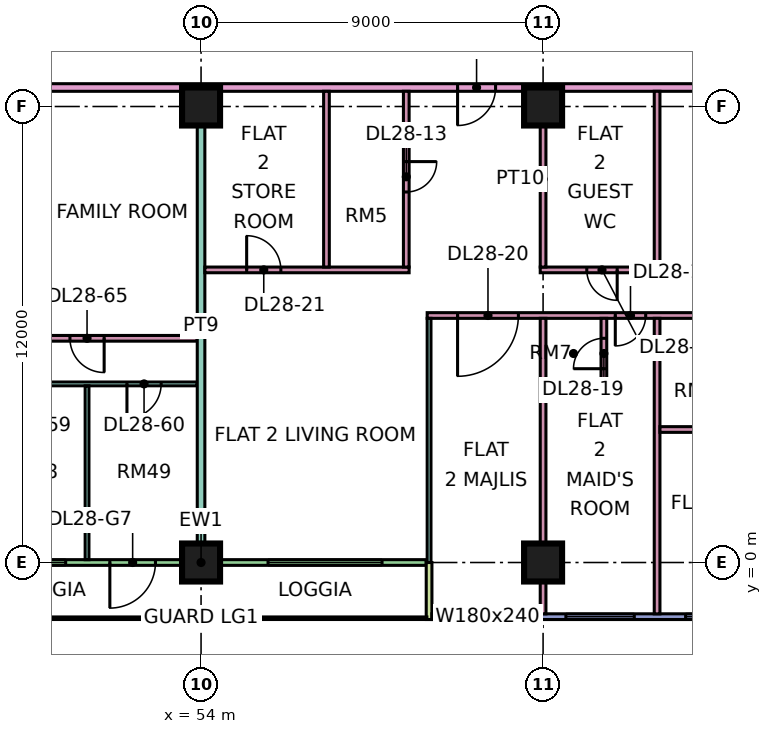
"""IFC4 building model, lengths in metres.
Left out: names, types, materials, properties, quantities, classifications, styles, units other than length and angle.
Written with IfcOpenShell. Run it as: python <this file> out.ifc"""

import sys

from ifc_helpers import new_model, si_unit, direction, frame, frame_2d, origin, origin_2d, place, context, subcontext, project, spatial, rectangle, extrude, element, fill, save


model = new_model("IFC4")
c1 = context("Model", 3, precision=1e-05, world=origin(), true_north=direction((0.0, 1.0)))
c2 = subcontext(c1, "Body", "Model", "MODEL_VIEW")
j1 = project(units=[si_unit("LENGTHUNIT", "METRE"), si_unit("PLANEANGLEUNIT", "RADIAN")], contexts=[c1])
p1 = place(None, origin())
s1 = spatial("IfcSite", under=j1, at=p1, CompositionType="ELEMENT")
p2 = place(p1, origin())
s2 = spatial("IfcBuilding", under=s1, at=p2, CompositionType="ELEMENT")
p3 = place(p2, frame((0.0, 0.0, 121.9)))
s3 = spatial("IfcBuildingStorey", under=s2, at=p3, CompositionType="ELEMENT", Elevation=121.9)
for number, where, z_axis, x_axis in (
    (1, (54.0, 0.0, 0.0), (0.0, 0.0, 1.0), (1.0, 0.0, 0.0)),
    (2, (54.0, 12.0, 0.0), (0.0, 0.0, 1.0), (1.0, 0.0, 0.0)),
    (3, (63.0, 0.0, 0.0), (0.0, 0.0, 1.0), (1.0, 0.0, 0.0)),
    (4, (63.0, 12.0, 0.0), (0.0, 0.0, 1.0), (1.0, 0.0, 0.0)),
):
    element("IfcColumn", number, at=place(p3, frame(where, z_axis=z_axis, x_axis=x_axis)), inside=s3, PredefinedType="COLUMN", context=c2, shape_type="SweptSolid", body=[
        extrude(rectangle(XDim=1.0, YDim=1.0, at=origin_2d()), origin(), (0.0, 0.0, 1.0), 3.75),
    ])
p4 = place(p3, frame((48.075, 0.0, 0.0), z_axis=(0.0, 0.0, 1.0), x_axis=(1.0, 0.0, 0.0)))
e5 = element("IfcWall", 5, at=p4, inside=s3, PredefinedType="SOLIDWALL", context=c2, shape_type="SweptSolid", body=[
    extrude(rectangle(XDim=11.85, YDim=0.15, at=frame_2d((5.925, 0.0))), origin(), (0.0, 0.0, 1.0), 3.35),
])
p5 = place(p4, frame((0.562, 0.0, 0.45)))
e6 = element("IfcOpeningElement", 6, at=p5, cuts=e5, PredefinedType="OPENING", context=c2, shape_type="SweptSolid", body=[
    extrude(rectangle(XDim=1.8, YDim=2.4, at=frame_2d((0.9, 1.2))), frame((0.0, 0.085, 0.0), z_axis=(0.0, -1.0, 0.0), x_axis=(1.0, 0.0, 0.0)), (0.0, 0.0, 1.0), 0.17),
])
p6 = place(p4, frame((3.525, 0.0, 0.0)))
e7 = element("IfcOpeningElement", 7, at=p6, cuts=e5, PredefinedType="OPENING", context=c2, shape_type="SweptSolid", body=[
    extrude(rectangle(XDim=1.2, YDim=2.4, at=frame_2d((0.6, 1.2))), frame((0.0, 0.085, 0.0), z_axis=(0.0, -1.0, 0.0), x_axis=(1.0, 0.0, 0.0)), (0.0, 0.0, 1.0), 0.17),
])
p7 = place(p4, frame((7.688, 0.0, 0.45)))
e8 = element("IfcOpeningElement", 8, at=p7, cuts=e5, PredefinedType="OPENING", context=c2, shape_type="SweptSolid", body=[
    extrude(rectangle(XDim=3.0, YDim=2.4, at=frame_2d((1.5, 1.2))), frame((0.0, 0.085, 0.0), z_axis=(0.0, -1.0, 0.0), x_axis=(1.0, 0.0, 0.0)), (0.0, 0.0, 1.0), 0.17),
])
p8 = place(p3, frame((60.0, -1.5, 0.0), z_axis=(0.0, 0.0, 1.0), x_axis=(0.0, 1.0, 0.0)))
e9 = element("IfcWall", 9, at=p8, inside=s3, PredefinedType="SOLIDWALL", context=c2, shape_type="SweptSolid", body=[
    extrude(rectangle(XDim=1.5, YDim=0.15, at=frame_2d((0.75, 0.0))), origin(), (0.0, 0.0, 1.0), 3.35),
])
p9 = place(p3, frame((60.075, -1.425, 0.0), z_axis=(0.0, 0.0, 1.0), x_axis=(1.0, 0.0, 0.0)))
e10 = element("IfcWall", 10, at=p9, inside=s3, PredefinedType="SOLIDWALL", context=c2, shape_type="SweptSolid", body=[
    extrude(rectangle(XDim=10.425, YDim=0.15, at=frame_2d((5.212, 0.0))), origin(), (0.0, 0.0, 1.0), 3.35),
])
p10 = place(p9, frame((0.562, 0.0, 0.45)))
e11 = element("IfcOpeningElement", 11, at=p10, cuts=e10, PredefinedType="OPENING", context=c2, shape_type="SweptSolid", body=[
    extrude(rectangle(XDim=1.8, YDim=2.4, at=frame_2d((0.9, 1.2))), frame((0.0, 0.085, 0.0), z_axis=(0.0, -1.0, 0.0), x_axis=(1.0, 0.0, 0.0)), (0.0, 0.0, 1.0), 0.17),
])
p11 = place(p9, frame((3.525, 0.0, 0.45)))
e12 = element("IfcOpeningElement", 12, at=p11, cuts=e10, PredefinedType="OPENING", context=c2, shape_type="SweptSolid", body=[
    extrude(rectangle(XDim=1.8, YDim=2.4, at=frame_2d((0.9, 1.2))), frame((0.0, 0.085, 0.0), z_axis=(0.0, -1.0, 0.0), x_axis=(1.0, 0.0, 0.0)), (0.0, 0.0, 1.0), 0.17),
])
p12 = place(p9, frame((6.675, 0.0, 0.45)))
e13 = element("IfcOpeningElement", 13, at=p12, cuts=e10, PredefinedType="OPENING", context=c2, shape_type="SweptSolid", body=[
    extrude(rectangle(XDim=3.0, YDim=2.4, at=frame_2d((1.5, 1.2))), frame((0.0, 0.085, 0.0), z_axis=(0.0, -1.0, 0.0), x_axis=(1.0, 0.0, 0.0)), (0.0, 0.0, 1.0), 0.17),
])
p13 = place(p3, frame((33.05, 4.7, 0.0), z_axis=(0.0, 0.0, 1.0), x_axis=(1.0, 0.0, 0.0)))
e14 = element("IfcWall", 14, at=p13, inside=s3, PredefinedType="PARTITIONING", context=c2, shape_type="SweptSolid", body=[
    extrude(rectangle(XDim=20.85, YDim=0.1, at=frame_2d((10.425, 0.0))), origin(), (0.0, 0.0, 1.0), 3.35),
])
p14 = place(p13, frame((1.0, 0.0, 0.0)))
e15 = element("IfcOpeningElement", 15, at=p14, cuts=e14, PredefinedType="OPENING", context=c2, shape_type="SweptSolid", body=[
    extrude(rectangle(XDim=0.9, YDim=2.1, at=frame_2d((0.45, 1.05))), frame((0.0, 0.06, 0.0), z_axis=(0.0, -1.0, 0.0), x_axis=(1.0, 0.0, 0.0)), (0.0, 0.0, 1.0), 0.12),
])
p15 = place(p13, frame((4.0, 0.0, 0.0)))
e16 = element("IfcOpeningElement", 16, at=p15, cuts=e14, PredefinedType="OPENING", context=c2, shape_type="SweptSolid", body=[
    extrude(rectangle(XDim=0.9, YDim=2.1, at=frame_2d((0.45, 1.05))), frame((0.0, 0.06, 0.0), z_axis=(0.0, -1.0, 0.0), x_axis=(1.0, 0.0, 0.0)), (0.0, 0.0, 1.0), 0.12),
])
p16 = place(p13, frame((16.0, 0.0, 0.0)))
e17 = element("IfcOpeningElement", 17, at=p16, cuts=e14, PredefinedType="OPENING", context=c2, shape_type="SweptSolid", body=[
    extrude(rectangle(XDim=0.9, YDim=2.1, at=frame_2d((0.45, 1.05))), frame((0.0, 0.06, 0.0), z_axis=(0.0, -1.0, 0.0), x_axis=(1.0, 0.0, 0.0)), (0.0, 0.0, 1.0), 0.12),
])
p17 = place(p13, frame((19.0, 0.0, 0.0)))
e18 = element("IfcOpeningElement", 18, at=p17, cuts=e14, PredefinedType="OPENING", context=c2, shape_type="SweptSolid", body=[
    extrude(rectangle(XDim=0.9, YDim=2.1, at=frame_2d((0.45, 1.05))), frame((0.0, 0.06, 0.0), z_axis=(0.0, -1.0, 0.0), x_axis=(1.0, 0.0, 0.0)), (0.0, 0.0, 1.0), 0.12),
])
p18 = place(p13, frame((10.0, 0.0, 0.0)))
e19 = element("IfcOpeningElement", 19, at=p18, cuts=e14, PredefinedType="OPENING", context=c2, shape_type="SweptSolid", body=[
    extrude(rectangle(XDim=0.9, YDim=2.1, at=frame_2d((0.45, 1.05))), frame((0.0, 0.06, 0.0), z_axis=(0.0, -1.0, 0.0), x_axis=(1.0, 0.0, 0.0)), (0.0, 0.0, 1.0), 0.12),
])
p19 = place(p3, frame((40.65, 12.5, 0.0), z_axis=(0.0, 0.0, 1.0), x_axis=(1.0, 0.0, 0.0)))
e20 = element("IfcWall", 20, at=p19, inside=s3, PredefinedType="PARTITIONING", context=c2, shape_type="SweptSolid", body=[
    extrude(rectangle(XDim=31.35, YDim=0.2, at=frame_2d((15.675, 0.0))), origin(), (0.0, 0.0, 1.0), 3.35),
])
p20 = place(p19, frame((20.1, 0.0, 0.0)))
e21 = element("IfcOpeningElement", 21, at=p20, cuts=e20, PredefinedType="OPENING", context=c2, shape_type="SweptSolid", body=[
    extrude(rectangle(XDim=1.0, YDim=2.1, at=frame_2d((0.5, 1.05))), frame((0.0, 0.11, 0.0), z_axis=(0.0, -1.0, 0.0), x_axis=(1.0, 0.0, 0.0)), (0.0, 0.0, 1.0), 0.22),
])
p21 = place(p19, frame((1.05, 0.0, 0.0)))
e22 = element("IfcOpeningElement", 22, at=p21, cuts=e20, PredefinedType="OPENING", context=c2, shape_type="SweptSolid", body=[
    extrude(rectangle(XDim=1.0, YDim=2.1, at=frame_2d((0.5, 1.05))), frame((0.0, 0.11, 0.0), z_axis=(0.0, -1.0, 0.0), x_axis=(1.0, 0.0, 0.0)), (0.0, 0.0, 1.0), 0.22),
])
p22 = place(p3, frame((43.575, 5.9, 0.0), z_axis=(0.0, 0.0, 1.0), x_axis=(1.0, 0.0, 0.0)))
e23 = element("IfcWall", 23, at=p22, inside=s3, PredefinedType="PARTITIONING", context=c2, shape_type="SweptSolid", body=[
    extrude(rectangle(XDim=10.325, YDim=0.15, at=frame_2d((5.163, 0.0))), origin(), (0.0, 0.0, 1.0), 3.35),
])
p23 = place(p22, frame((1.825, 0.0, 0.0)))
e24 = element("IfcOpeningElement", 24, at=p23, cuts=e23, PredefinedType="OPENING", context=c2, shape_type="SweptSolid", body=[
    extrude(rectangle(XDim=0.8, YDim=2.1, at=frame_2d((0.4, 1.05))), frame((0.0, 0.085, 0.0), z_axis=(0.0, -1.0, 0.0), x_axis=(1.0, 0.0, 0.0)), (0.0, 0.0, 1.0), 0.17),
])
p24 = place(p22, frame((6.975, 0.0, 0.0)))
e25 = element("IfcOpeningElement", 25, at=p24, cuts=e23, PredefinedType="OPENING", context=c2, shape_type="SweptSolid", body=[
    extrude(rectangle(XDim=0.9, YDim=2.1, at=frame_2d((0.45, 1.05))), frame((0.0, 0.085, 0.0), z_axis=(0.0, -1.0, 0.0), x_axis=(1.0, 0.0, 0.0)), (0.0, 0.0, 1.0), 0.17),
])
p25 = place(p3, frame((51.0, 0.074, 0.0), z_axis=(0.0, 0.0, 1.0), x_axis=(0.0, 1.0, 0.0)))
e26 = element("IfcWall", 26, at=p25, inside=s3, PredefinedType="PARTITIONING", context=c2, shape_type="SweptSolid", body=[
    extrude(rectangle(XDim=4.576, YDim=0.1, at=frame_2d((2.288, 0.0))), origin(), (0.0, 0.0, 1.0), 3.35),
])
p26 = place(p3, frame((54.0, 0.074, 0.0), z_axis=(0.0, 0.0, 1.0), x_axis=(0.0, 1.0, 0.0)))
e27 = element("IfcWall", 27, at=p26, inside=s3, PredefinedType="PARTITIONING", context=c2, shape_type="SweptSolid", body=[
    extrude(rectangle(XDim=12.326, YDim=0.2, at=frame_2d((6.163, 0.0))), origin(), (0.0, 0.0, 1.0), 3.35),
])
p27 = place(p3, frame((54.1, 7.7, 0.0), z_axis=(0.0, 0.0, 1.0), x_axis=(1.0, 0.0, 0.0)))
e28 = element("IfcWall", 28, at=p27, inside=s3, PredefinedType="PARTITIONING", context=c2, shape_type="SweptSolid", body=[
    extrude(rectangle(XDim=5.375, YDim=0.15, at=frame_2d((2.688, 0.0))), origin(), (0.0, 0.0, 1.0), 3.35),
])
p28 = place(p27, frame((1.1, 0.0, 0.0)))
e29 = element("IfcOpeningElement", 29, at=p28, cuts=e28, PredefinedType="OPENING", context=c2, shape_type="SweptSolid", body=[
    extrude(rectangle(XDim=0.9, YDim=2.1, at=frame_2d((0.45, 1.05))), frame((0.0, 0.085, 0.0), z_axis=(0.0, -1.0, 0.0), x_axis=(1.0, 0.0, 0.0)), (0.0, 0.0, 1.0), 0.17),
])
p29 = place(p3, frame((57.3, 7.775, 0.0), z_axis=(0.0, 0.0, 1.0), x_axis=(0.0, 1.0, 0.0)))
e30 = element("IfcWall", 30, at=p29, inside=s3, PredefinedType="PARTITIONING", context=c2, shape_type="SweptSolid", body=[
    extrude(rectangle(XDim=4.625, YDim=0.15, at=frame_2d((2.312, 0.0))), origin(), (0.0, 0.0, 1.0), 3.35),
])
p30 = place(p3, frame((59.4, 7.775, 0.0), z_axis=(0.0, 0.0, 1.0), x_axis=(0.0, 1.0, 0.0)))
e31 = element("IfcWall", 31, at=p30, inside=s3, PredefinedType="PARTITIONING", context=c2, shape_type="SweptSolid", body=[
    extrude(rectangle(XDim=4.625, YDim=0.15, at=frame_2d((2.312, 0.0))), origin(), (0.0, 0.0, 1.0), 3.35),
])
p31 = place(p30, frame((1.975, 0.0, 0.0)))
e32 = element("IfcOpeningElement", 32, at=p31, cuts=e31, PredefinedType="OPENING", context=c2, shape_type="SweptSolid", body=[
    extrude(rectangle(XDim=0.8, YDim=2.1, at=frame_2d((0.4, 1.05))), frame((0.0, 0.085, 0.0), z_axis=(0.0, -1.0, 0.0), x_axis=(1.0, 0.0, 0.0)), (0.0, 0.0, 1.0), 0.17),
])
p32 = place(p3, frame((59.95, 6.5, 0.0), z_axis=(0.0, 0.0, 1.0), x_axis=(1.0, 0.0, 0.0)))
e33 = element("IfcWall", 33, at=p32, inside=s3, PredefinedType="PARTITIONING", context=c2, shape_type="SweptSolid", body=[
    extrude(rectangle(XDim=11.976, YDim=0.15, at=frame_2d((5.988, 0.0))), origin(), (0.0, 0.0, 1.0), 3.35),
])
p33 = place(p32, frame((10.1, 0.0, 0.0)))
e34 = element("IfcOpeningElement", 34, at=p33, cuts=e33, PredefinedType="OPENING", context=c2, shape_type="SweptSolid", body=[
    extrude(rectangle(XDim=0.9, YDim=2.1, at=frame_2d((0.45, 1.05))), frame((0.0, 0.085, 0.0), z_axis=(0.0, -1.0, 0.0), x_axis=(1.0, 0.0, 0.0)), (0.0, 0.0, 1.0), 0.17),
])
p34 = place(p32, frame((4.95, 0.0, 0.0)))
e35 = element("IfcOpeningElement", 35, at=p34, cuts=e33, PredefinedType="OPENING", context=c2, shape_type="SweptSolid", body=[
    extrude(rectangle(XDim=0.8, YDim=2.1, at=frame_2d((0.4, 1.05))), frame((0.0, 0.085, 0.0), z_axis=(0.0, -1.0, 0.0), x_axis=(1.0, 0.0, 0.0)), (0.0, 0.0, 1.0), 0.17),
])
p35 = place(p32, frame((0.8, 0.0, 0.0)))
e36 = element("IfcOpeningElement", 36, at=p35, cuts=e33, PredefinedType="OPENING", context=c2, shape_type="SweptSolid", body=[
    extrude(rectangle(XDim=1.6, YDim=2.1, at=frame_2d((0.8, 1.05))), frame((0.0, 0.085, 0.0), z_axis=(0.0, -1.0, 0.0), x_axis=(1.0, 0.0, 0.0)), (0.0, 0.0, 1.0), 0.17),
])
p36 = place(p3, frame((60.0, 0.0, 0.0), z_axis=(0.0, 0.0, 1.0), x_axis=(0.0, 1.0, 0.0)))
e37 = element("IfcWall", 37, at=p36, inside=s3, PredefinedType="PARTITIONING", context=c2, shape_type="SweptSolid", body=[
    extrude(rectangle(XDim=6.425, YDim=0.1, at=frame_2d((3.212, 0.0))), origin(), (0.0, 0.0, 1.0), 3.35),
])
p37 = place(p3, frame((62.925, 7.7, 0.0), z_axis=(0.0, 0.0, 1.0), x_axis=(1.0, 0.0, 0.0)))
e38 = element("IfcWall", 38, at=p37, inside=s3, PredefinedType="PARTITIONING", context=c2, shape_type="SweptSolid", body=[
    extrude(rectangle(XDim=9.001, YDim=0.15, at=frame_2d((4.5, 0.0))), origin(), (0.0, 0.0, 1.0), 3.35),
])
p38 = place(p37, frame((5.625, 0.0, 0.0)))
e39 = element("IfcOpeningElement", 39, at=p38, cuts=e38, PredefinedType="OPENING", context=c2, shape_type="SweptSolid", body=[
    extrude(rectangle(XDim=0.9, YDim=2.1, at=frame_2d((0.45, 1.05))), frame((0.0, 0.085, 0.0), z_axis=(0.0, -1.0, 0.0), x_axis=(1.0, 0.0, 0.0)), (0.0, 0.0, 1.0), 0.17),
])
p39 = place(p37, frame((1.225, 0.0, 0.0)))
e40 = element("IfcOpeningElement", 40, at=p39, cuts=e38, PredefinedType="OPENING", context=c2, shape_type="SweptSolid", body=[
    extrude(rectangle(XDim=0.8, YDim=2.1, at=frame_2d((0.4, 1.05))), frame((0.0, 0.085, 0.0), z_axis=(0.0, -1.0, 0.0), x_axis=(1.0, 0.0, 0.0)), (0.0, 0.0, 1.0), 0.17),
])
p40 = place(p3, frame((63.0, -1.351, 0.0), z_axis=(0.0, 0.0, 1.0), x_axis=(0.0, 1.0, 0.0)))
e41 = element("IfcWall", 41, at=p40, inside=s3, PredefinedType="PARTITIONING", context=c2, shape_type="SweptSolid", body=[
    extrude(rectangle(XDim=7.776, YDim=0.15, at=frame_2d((3.888, 0.0))), origin(), (0.0, 0.0, 1.0), 3.35),
])
p41 = place(p3, frame((63.0, 7.775, 0.0), z_axis=(0.0, 0.0, 1.0), x_axis=(0.0, 1.0, 0.0)))
e42 = element("IfcWall", 42, at=p41, inside=s3, PredefinedType="PARTITIONING", context=c2, shape_type="SweptSolid", body=[
    extrude(rectangle(XDim=4.625, YDim=0.15, at=frame_2d((2.312, 0.0))), origin(), (0.0, 0.0, 1.0), 3.35),
])
p42 = place(p3, frame((63.075, 4.5, 0.0), z_axis=(0.0, 0.0, 1.0), x_axis=(1.0, 0.0, 0.0)))
e43 = element("IfcWall", 43, at=p42, inside=s3, PredefinedType="PARTITIONING", context=c2, shape_type="SweptSolid", body=[
    extrude(rectangle(XDim=1.45, YDim=0.15, at=frame_2d((0.725, 0.0))), origin(), (0.0, 0.0, 1.0), 3.35),
])
p43 = place(p3, frame((64.6, 4.425, 0.0), z_axis=(0.0, 0.0, 1.0), x_axis=(0.0, 1.0, 0.0)))
e44 = element("IfcWall", 44, at=p43, inside=s3, PredefinedType="PARTITIONING", context=c2, shape_type="SweptSolid", body=[
    extrude(rectangle(XDim=2.0, YDim=0.15, at=frame_2d((1.0, 0.0))), origin(), (0.0, 0.0, 1.0), 3.35),
])
p44 = place(p43, frame((0.675, 0.0, 0.0)))
e45 = element("IfcOpeningElement", 45, at=p44, cuts=e44, PredefinedType="OPENING", context=c2, shape_type="SweptSolid", body=[
    extrude(rectangle(XDim=0.8, YDim=2.1, at=frame_2d((0.4, 1.05))), frame((0.0, 0.085, 0.0), z_axis=(0.0, -1.0, 0.0), x_axis=(1.0, 0.0, 0.0)), (0.0, 0.0, 1.0), 0.17),
])
p45 = place(p3, frame((66.0, -1.351, 0.0), z_axis=(0.0, 0.0, 1.0), x_axis=(0.0, 1.0, 0.0)))
e46 = element("IfcWall", 46, at=p45, inside=s3, PredefinedType="PARTITIONING", context=c2, shape_type="SweptSolid", body=[
    extrude(rectangle(XDim=7.776, YDim=0.15, at=frame_2d((3.888, 0.0))), origin(), (0.0, 0.0, 1.0), 3.35),
])
p46 = place(p3, frame((66.0, 7.775, 0.0), z_axis=(0.0, 0.0, 1.0), x_axis=(0.0, 1.0, 0.0)))
e47 = element("IfcWall", 47, at=p46, inside=s3, PredefinedType="PARTITIONING", context=c2, shape_type="SweptSolid", body=[
    extrude(rectangle(XDim=4.625, YDim=0.15, at=frame_2d((2.312, 0.0))), origin(), (0.0, 0.0, 1.0), 3.35),
])
p47 = place(p3, frame((66.075, 3.5, 0.0), z_axis=(0.0, 0.0, 1.0), x_axis=(1.0, 0.0, 0.0)))
e48 = element("IfcWall", 48, at=p47, inside=s3, PredefinedType="PARTITIONING", context=c2, shape_type="SweptSolid", body=[
    extrude(rectangle(XDim=2.85, YDim=0.15, at=frame_2d((1.425, 0.0))), origin(), (0.0, 0.0, 1.0), 3.35),
])
p48 = place(p5, origin())
e49 = element("IfcWindow", 49, at=p48, inside=s3, PartitioningType="SINGLE_PANEL", PredefinedType="WINDOW", context=c2, shape_type="SweptSolid", body=[
    extrude(rectangle(XDim=1.8, YDim=2.4, at=frame_2d((0.9, 1.2))), frame((0.0, 0.03, 0.0), z_axis=(0.0, -1.0, 0.0), x_axis=(1.0, 0.0, 0.0)), (0.0, 0.0, 1.0), 0.06),
])
fill(e6, e49)
p49 = place(p6, frame((1.2, 0.0, 0.0), z_axis=(0.0, 0.0, 1.0), x_axis=(-1.0, 0.0, 0.0)))
e50 = element("IfcDoor", 50, at=p49, inside=s3, OperationType="DOUBLE_DOOR_SINGLE_SWING", PredefinedType="DOOR", context=c2, shape_type="SweptSolid", body=[
    extrude(rectangle(XDim=1.2, YDim=2.4, at=frame_2d((0.6, 1.2))), frame((0.0, 0.025, 0.0), z_axis=(0.0, -1.0, 0.0), x_axis=(1.0, 0.0, 0.0)), (0.0, 0.0, 1.0), 0.05),
])
fill(e7, e50)
p50 = place(p7, origin())
e51 = element("IfcWindow", 51, at=p50, inside=s3, PartitioningType="SINGLE_PANEL", PredefinedType="WINDOW", context=c2, shape_type="SweptSolid", body=[
    extrude(rectangle(XDim=3.0, YDim=2.4, at=frame_2d((1.5, 1.2))), frame((0.0, 0.03, 0.0), z_axis=(0.0, -1.0, 0.0), x_axis=(1.0, 0.0, 0.0)), (0.0, 0.0, 1.0), 0.06),
])
fill(e8, e51)
p51 = place(p10, origin())
e52 = element("IfcWindow", 52, at=p51, inside=s3, PartitioningType="SINGLE_PANEL", PredefinedType="WINDOW", context=c2, shape_type="SweptSolid", body=[
    extrude(rectangle(XDim=1.8, YDim=2.4, at=frame_2d((0.9, 1.2))), frame((0.0, 0.03, 0.0), z_axis=(0.0, -1.0, 0.0), x_axis=(1.0, 0.0, 0.0)), (0.0, 0.0, 1.0), 0.06),
])
fill(e11, e52)
p52 = place(p11, origin())
e53 = element("IfcWindow", 53, at=p52, inside=s3, PartitioningType="SINGLE_PANEL", PredefinedType="WINDOW", context=c2, shape_type="SweptSolid", body=[
    extrude(rectangle(XDim=1.8, YDim=2.4, at=frame_2d((0.9, 1.2))), frame((0.0, 0.03, 0.0), z_axis=(0.0, -1.0, 0.0), x_axis=(1.0, 0.0, 0.0)), (0.0, 0.0, 1.0), 0.06),
])
fill(e12, e53)
p53 = place(p12, origin())
e54 = element("IfcWindow", 54, at=p53, inside=s3, PartitioningType="SINGLE_PANEL", PredefinedType="WINDOW", context=c2, shape_type="SweptSolid", body=[
    extrude(rectangle(XDim=3.0, YDim=2.4, at=frame_2d((1.5, 1.2))), frame((0.0, 0.03, 0.0), z_axis=(0.0, -1.0, 0.0), x_axis=(1.0, 0.0, 0.0)), (0.0, 0.0, 1.0), 0.06),
])
fill(e13, e54)
p54 = place(p31, origin())
e55 = element("IfcDoor", 55, at=p54, inside=s3, OperationType="SINGLE_SWING_RIGHT", PredefinedType="DOOR", context=c2, shape_type="SweptSolid", body=[
    extrude(rectangle(XDim=0.8, YDim=2.1, at=frame_2d((0.4, 1.05))), frame((0.0, 0.025, 0.0), z_axis=(0.0, -1.0, 0.0), x_axis=(1.0, 0.0, 0.0)), (0.0, 0.0, 1.0), 0.05),
])
fill(e32, e55)
p55 = place(p20, frame((1.0, 0.0, 0.0), z_axis=(0.0, 0.0, 1.0), x_axis=(-1.0, 0.0, 0.0)))
e56 = element("IfcDoor", 56, at=p55, inside=s3, OperationType="SINGLE_SWING_LEFT", PredefinedType="DOOR", context=c2, shape_type="SweptSolid", body=[
    extrude(rectangle(XDim=1.0, YDim=2.1, at=frame_2d((0.5, 1.05))), frame((0.0, 0.025, 0.0), z_axis=(0.0, -1.0, 0.0), x_axis=(1.0, 0.0, 0.0)), (0.0, 0.0, 1.0), 0.05),
])
fill(e21, e56)
p56 = place(p34, frame((0.8, 0.0, 0.0), z_axis=(0.0, 0.0, 1.0), x_axis=(-1.0, 0.0, 0.0)))
e57 = element("IfcDoor", 57, at=p56, inside=s3, OperationType="SINGLE_SWING_LEFT", PredefinedType="DOOR", context=c2, shape_type="SweptSolid", body=[
    extrude(rectangle(XDim=0.8, YDim=2.1, at=frame_2d((0.4, 1.05))), frame((0.0, 0.025, 0.0), z_axis=(0.0, -1.0, 0.0), x_axis=(1.0, 0.0, 0.0)), (0.0, 0.0, 1.0), 0.05),
])
fill(e35, e57)
p57 = place(p44, origin())
e58 = element("IfcDoor", 58, at=p57, inside=s3, OperationType="SINGLE_SWING_LEFT", PredefinedType="DOOR", context=c2, shape_type="SweptSolid", body=[
    extrude(rectangle(XDim=0.8, YDim=2.1, at=frame_2d((0.4, 1.05))), frame((0.0, 0.025, 0.0), z_axis=(0.0, -1.0, 0.0), x_axis=(1.0, 0.0, 0.0)), (0.0, 0.0, 1.0), 0.05),
])
fill(e45, e58)
p58 = place(p35, frame((1.6, 0.0, 0.0), z_axis=(0.0, 0.0, 1.0), x_axis=(-1.0, 0.0, 0.0)))
e59 = element("IfcDoor", 59, at=p58, inside=s3, OperationType="DOUBLE_DOOR_SINGLE_SWING", PredefinedType="DOOR", context=c2, shape_type="SweptSolid", body=[
    extrude(rectangle(XDim=1.6, YDim=2.1, at=frame_2d((0.8, 1.05))), frame((0.0, 0.025, 0.0), z_axis=(0.0, -1.0, 0.0), x_axis=(1.0, 0.0, 0.0)), (0.0, 0.0, 1.0), 0.05),
])
fill(e36, e59)
p59 = place(p28, origin())
e60 = element("IfcDoor", 60, at=p59, inside=s3, OperationType="SINGLE_SWING_LEFT", PredefinedType="DOOR", context=c2, shape_type="SweptSolid", body=[
    extrude(rectangle(XDim=0.9, YDim=2.1, at=frame_2d((0.45, 1.05))), frame((0.0, 0.025, 0.0), z_axis=(0.0, -1.0, 0.0), x_axis=(1.0, 0.0, 0.0)), (0.0, 0.0, 1.0), 0.05),
])
fill(e29, e60)
p60 = place(p39, origin())
e61 = element("IfcDoor", 61, at=p60, inside=s3, OperationType="SINGLE_SWING_RIGHT", PredefinedType="DOOR", context=c2, shape_type="SweptSolid", body=[
    extrude(rectangle(XDim=0.8, YDim=2.1, at=frame_2d((0.4, 1.05))), frame((0.0, 0.025, 0.0), z_axis=(0.0, -1.0, 0.0), x_axis=(1.0, 0.0, 0.0)), (0.0, 0.0, 1.0), 0.05),
])
fill(e40, e61)
p61 = place(p17, frame((0.9, 0.0, 0.0), z_axis=(0.0, 0.0, 1.0), x_axis=(-1.0, 0.0, 0.0)))
e62 = element("IfcDoor", 62, at=p61, inside=s3, OperationType="SINGLE_SWING_LEFT", PredefinedType="DOOR", context=c2, shape_type="SweptSolid", body=[
    extrude(rectangle(XDim=0.9, YDim=2.1, at=frame_2d((0.45, 1.05))), frame((0.0, 0.025, 0.0), z_axis=(0.0, -1.0, 0.0), x_axis=(1.0, 0.0, 0.0)), (0.0, 0.0, 1.0), 0.05),
])
fill(e18, e62)
p62 = place(p24, origin())
e63 = element("IfcDoor", 63, at=p62, inside=s3, OperationType="SINGLE_SWING_RIGHT", PredefinedType="DOOR", context=c2, shape_type="SweptSolid", body=[
    extrude(rectangle(XDim=0.9, YDim=2.1, at=frame_2d((0.45, 1.05))), frame((0.0, 0.025, 0.0), z_axis=(0.0, -1.0, 0.0), x_axis=(1.0, 0.0, 0.0)), (0.0, 0.0, 1.0), 0.05),
])
fill(e25, e63)
save(model, sys.argv[1])
